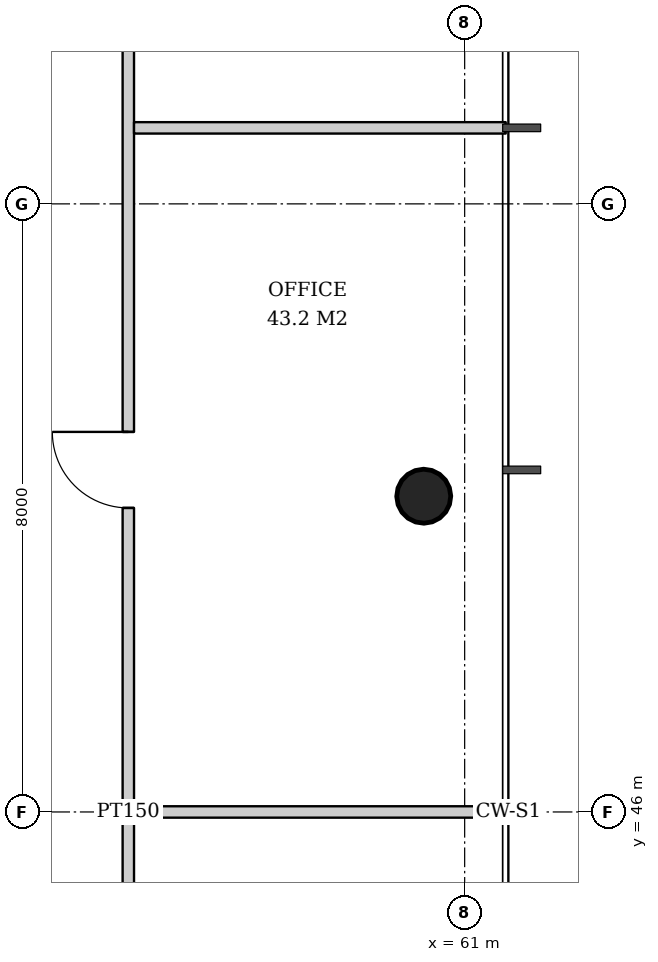
"""IFC4 building model, lengths in metres.
Left out: names, types, materials, properties, quantities, classifications, styles, units other than length and angle.
Written with IfcOpenShell. Run it as: python <this file> out.ifc"""

import sys

from ifc_helpers import new_model, si_unit, direction, frame, frame_2d, origin, origin_2d, place, context, subcontext, project, spatial, rectangle, hollow_circle, extrude, element, fill, save


model = new_model("IFC4")
c1 = context("Model", 3, precision=1e-05, world=origin(), true_north=direction((0.0, 1.0)))
c2 = subcontext(c1, "Body", "Model", "MODEL_VIEW")
j1 = project(units=[si_unit("LENGTHUNIT", "METRE"), si_unit("PLANEANGLEUNIT", "RADIAN")], contexts=[c1])
p1 = place(None, origin())
s1 = spatial("IfcSite", under=j1, at=p1, CompositionType="ELEMENT")
p2 = place(p1, origin())
s2 = spatial("IfcBuilding", under=s1, at=p2, CompositionType="ELEMENT")
p3 = place(p2, frame((0.0, 0.0, 287.0)))
s3 = spatial("IfcBuildingStorey", under=s2, at=p3, CompositionType="ELEMENT", Elevation=287.0)
p4 = place(p3, frame((60.5, 50.167, 0.0), z_axis=(-0.031912535354, -0.010658915229, 0.999433828532), x_axis=(0.316800238982, -0.948492281772, 0.0)))
e1 = element("IfcColumn", 1, at=p4, inside=s3, PredefinedType="COLUMN", context=c2, shape_type="SweptSolid", body=[
    extrude(hollow_circle(Radius=0.355, WallThickness=0.025, at=origin_2d()), origin(), (0.0, 0.0, 1.0), 3.802),
])
p5 = place(p3, frame((56.65, 46.0, 0.0), z_axis=(0.0, 0.0, 1.0), x_axis=(1.0, 0.0, 0.0)))
e2 = element("IfcWall", 2, at=p5, inside=s3, PredefinedType="PARTITIONING", context=c2, shape_type="SweptSolid", body=[
    extrude(rectangle(XDim=4.89, YDim=0.15, at=frame_2d((2.445, 0.0))), origin(), (0.0, 0.0, 1.0), 3.05),
])
p6 = place(p3, frame((56.575, 35.631, 0.0), z_axis=(0.0, 0.0, 1.0), x_axis=(0.0, 1.0, 0.0)))
e3 = element("IfcWall", 3, at=p6, inside=s3, PredefinedType="PARTITIONING", context=c2, shape_type="SweptSolid", body=[
    extrude(rectangle(XDim=20.737, YDim=0.15, at=frame_2d((10.369, 0.0))), origin(), (0.0, 0.0, 1.0), 2.95),
])
p7 = place(p6, frame((4.081, 0.0, 0.0)))
e4 = element("IfcOpeningElement", 4, at=p7, cuts=e3, PredefinedType="OPENING", context=c2, shape_type="SweptSolid", body=[
    extrude(rectangle(XDim=1.0, YDim=2.1, at=frame_2d((0.5, 1.05))), frame((0.0, 0.085, 0.0), z_axis=(0.0, -1.0, 0.0), x_axis=(1.0, 0.0, 0.0)), (0.0, 0.0, 1.0), 0.17),
])
p8 = place(p6, frame((14.369, 0.0, 0.0)))
e5 = element("IfcOpeningElement", 5, at=p8, cuts=e3, PredefinedType="OPENING", context=c2, shape_type="SweptSolid", body=[
    extrude(rectangle(XDim=1.0, YDim=2.1, at=frame_2d((0.5, 1.05))), frame((0.0, 0.085, 0.0), z_axis=(0.0, -1.0, 0.0), x_axis=(1.0, 0.0, 0.0)), (0.0, 0.0, 1.0), 0.17),
])
p9 = place(p3, frame((56.65, 55.0, 0.0), z_axis=(0.0, 0.0, 1.0), x_axis=(1.0, 0.0, 0.0)))
e6 = element("IfcWall", 6, at=p9, inside=s3, PredefinedType="PARTITIONING", context=c2, shape_type="SweptSolid", body=[
    extrude(rectangle(XDim=4.89, YDim=0.15, at=frame_2d((2.445, 0.0))), origin(), (0.0, 0.0, 1.0), 3.05),
])
p10 = place(p8, origin())
e7 = element("IfcDoor", 7, at=p10, inside=s3, OperationType="SINGLE_SWING_RIGHT", PredefinedType="DOOR", context=c2, shape_type="SweptSolid", body=[
    extrude(rectangle(XDim=1.0, YDim=2.1, at=frame_2d((0.5, 1.05))), frame((0.0, 0.025, 0.0), z_axis=(0.0, -1.0, 0.0), x_axis=(1.0, 0.0, 0.0)), (0.0, 0.0, 1.0), 0.05),
])
fill(e5, e7)
save(model, sys.argv[1])
